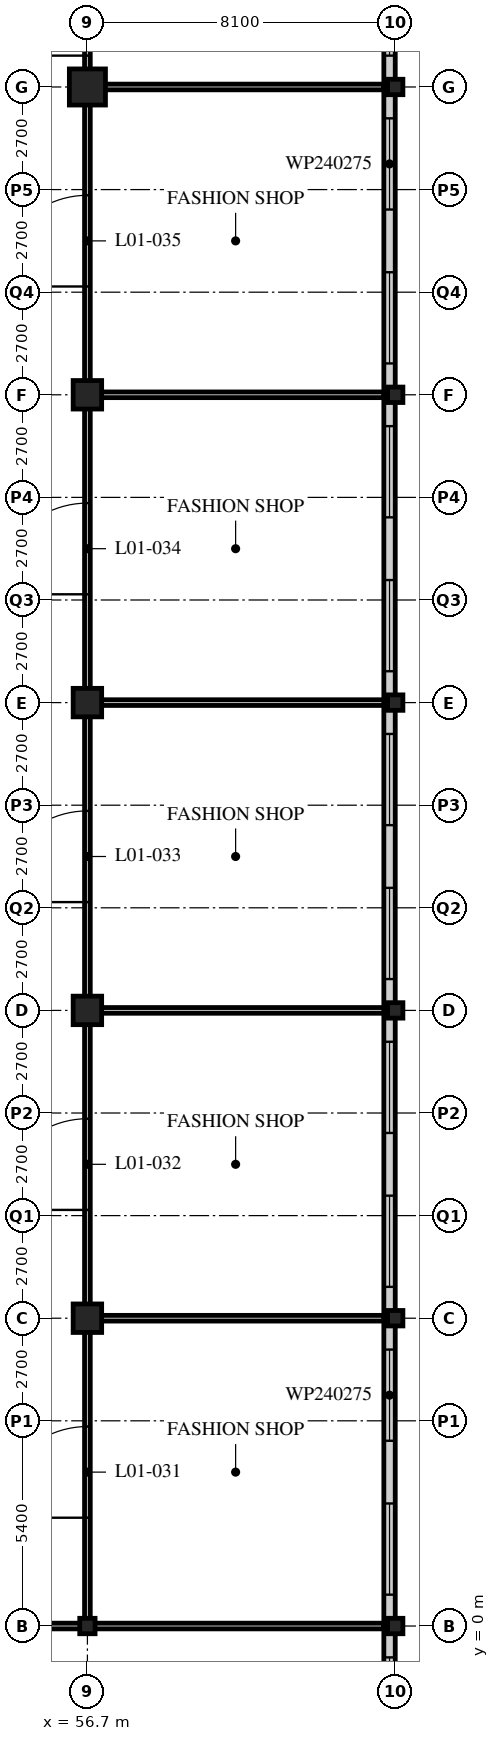
"""IFC4 building model, lengths in metres.
Left out: names, types, materials, properties, quantities, classifications, styles, units other than length and angle.
Written with IfcOpenShell. Run it as: python <this file> out.ifc"""

import sys

from ifc_helpers import new_model, si_unit, direction, frame, frame_2d, origin, origin_with_axes, origin_2d, place, context, subcontext, project, spatial, rectangle, hollow_rectangle, i_section, extrude, element, fill, save


model = new_model("IFC4")
c1 = context("Model", 3, precision=1e-05, world=origin(), true_north=direction((0.0, 1.0)))
c2 = subcontext(c1, "Body", "Model", "MODEL_VIEW")
j1 = project(units=[si_unit("LENGTHUNIT", "METRE"), si_unit("PLANEANGLEUNIT", "RADIAN")], contexts=[c1])
p1 = place(None, origin())
s1 = spatial("IfcSite", under=j1, at=p1, CompositionType="ELEMENT")
p2 = place(p1, origin())
s2 = spatial("IfcBuilding", under=s1, at=p2, CompositionType="ELEMENT")
p3 = place(p2, frame((0.0, 0.0, 6.0)))
s3 = spatial("IfcBuildingStorey", under=s2, at=p3, CompositionType="ELEMENT", Elevation=6.0)
p4 = place(p3, frame((56.7, 0.0, 0.0), z_axis=(0.0, 0.0, 1.0), x_axis=(1.0, 0.0, 0.0)))
e1 = element("IfcColumn", 1, at=p4, inside=s3, PredefinedType="COLUMN", context=c2, shape_type="SweptSolid", body=[
    extrude(i_section(OverallWidth=0.403, OverallDepth=0.406, WebThickness=0.027, FlangeThickness=0.043, FilletRadius=0.015, at=origin_2d()), origin(), (0.0, 0.0, 1.0), 5.4),
])
for number, where, z_axis, x_axis in (
    (2, (56.7, 8.1, 0.0), (0.0, 0.0, 1.0), (1.0, 0.0, 0.0)),
    (3, (56.7, 16.2, 0.0), (0.0, 0.0, 1.0), (1.0, 0.0, 0.0)),
    (4, (56.7, 24.3, 0.0), (0.0, 0.0, 1.0), (1.0, 0.0, 0.0)),
    (5, (56.7, 32.4, 0.0), (0.0, 0.0, 1.0), (1.0, 0.0, 0.0)),
):
    element("IfcColumn", number, at=place(p3, frame(where, z_axis=z_axis, x_axis=x_axis)), inside=s3, PredefinedType="COLUMN", context=c2, shape_type="SweptSolid", body=[
        extrude(hollow_rectangle(XDim=0.75, YDim=0.75, WallThickness=0.07, at=origin_2d()), origin(), (0.0, 0.0, 1.0), 5.4),
    ])
p5 = place(p3, frame((56.7, 40.5, 0.0), z_axis=(0.0, 0.0, 1.0), x_axis=(1.0, 0.0, 0.0)))
e6 = element("IfcColumn", 6, at=p5, inside=s3, PredefinedType="COLUMN", context=c2, shape_type="SweptSolid", body=[
    extrude(hollow_rectangle(XDim=0.95, YDim=0.95, WallThickness=0.1, at=origin_2d()), origin(), (0.0, 0.0, 1.0), 5.4),
])
for number, where, z_axis, x_axis in (
    (7, (64.8, 0.0, 0.0), (0.0, 0.0, 1.0), (1.0, 0.0, 0.0)),
    (8, (64.8, 8.1, 0.0), (0.0, 0.0, 1.0), (1.0, 0.0, 0.0)),
    (9, (64.8, 16.2, 0.0), (0.0, 0.0, 1.0), (1.0, 0.0, 0.0)),
    (10, (64.8, 24.3, 0.0), (0.0, 0.0, 1.0), (1.0, 0.0, 0.0)),
    (11, (64.8, 32.4, 0.0), (0.0, 0.0, 1.0), (1.0, 0.0, 0.0)),
    (12, (64.8, 40.5, 0.0), (0.0, 0.0, 1.0), (1.0, 0.0, 0.0)),
):
    element("IfcColumn", number, at=place(p3, frame(where, z_axis=z_axis, x_axis=x_axis)), inside=s3, PredefinedType="COLUMN", context=c2, shape_type="SweptSolid", body=[
        extrude(i_section(OverallWidth=0.403, OverallDepth=0.406, WebThickness=0.027, FlangeThickness=0.043, FilletRadius=0.015, at=origin_2d()), origin(), (0.0, 0.0, 1.0), 5.4),
    ])
p6 = place(p3, frame((64.65, -7.85, 0.0), z_axis=(0.0, 0.0, 1.0), x_axis=(0.0, 1.0, 0.0)))
e13 = element("IfcWall", 13, at=p6, inside=s3, PredefinedType="SOLIDWALL", context=c2, shape_type="SweptSolid", body=[
    extrude(rectangle(XDim=56.45, YDim=0.3, at=frame_2d((28.225, 0.0))), origin(), (0.0, 0.0, 1.0), 5.15),
])
p7 = place(p6, frame((0.575, 0.0, 1.0)))
e14 = element("IfcOpeningElement", 14, at=p7, cuts=e13, PredefinedType="OPENING", context=c2, shape_type="SweptSolid", body=[
    extrude(rectangle(XDim=2.4, YDim=2.75, at=frame_2d((1.2, 1.375))), frame((0.0, 0.16, 0.0), z_axis=(0.0, -1.0, 0.0), x_axis=(1.0, 0.0, 0.0)), (0.0, 0.0, 1.0), 0.32),
])
p8 = place(p6, frame((4.625, 0.0, 1.0)))
e15 = element("IfcOpeningElement", 15, at=p8, cuts=e13, PredefinedType="OPENING", context=c2, shape_type="SweptSolid", body=[
    extrude(rectangle(XDim=2.4, YDim=2.75, at=frame_2d((1.2, 1.375))), frame((0.0, 0.16, 0.0), z_axis=(0.0, -1.0, 0.0), x_axis=(1.0, 0.0, 0.0)), (0.0, 0.0, 1.0), 0.32),
])
p9 = place(p6, frame((8.675, 0.0, 1.0)))
e16 = element("IfcOpeningElement", 16, at=p9, cuts=e13, PredefinedType="OPENING", context=c2, shape_type="SweptSolid", body=[
    extrude(rectangle(XDim=2.4, YDim=2.75, at=frame_2d((1.2, 1.375))), frame((0.0, 0.16, 0.0), z_axis=(0.0, -1.0, 0.0), x_axis=(1.0, 0.0, 0.0)), (0.0, 0.0, 1.0), 0.32),
])
p10 = place(p6, frame((12.725, 0.0, 1.0)))
e17 = element("IfcOpeningElement", 17, at=p10, cuts=e13, PredefinedType="OPENING", context=c2, shape_type="SweptSolid", body=[
    extrude(rectangle(XDim=2.4, YDim=2.75, at=frame_2d((1.2, 1.375))), frame((0.0, 0.16, 0.0), z_axis=(0.0, -1.0, 0.0), x_axis=(1.0, 0.0, 0.0)), (0.0, 0.0, 1.0), 0.32),
])
p11 = place(p6, frame((16.775, 0.0, 1.0)))
e18 = element("IfcOpeningElement", 18, at=p11, cuts=e13, PredefinedType="OPENING", context=c2, shape_type="SweptSolid", body=[
    extrude(rectangle(XDim=2.4, YDim=2.75, at=frame_2d((1.2, 1.375))), frame((0.0, 0.16, 0.0), z_axis=(0.0, -1.0, 0.0), x_axis=(1.0, 0.0, 0.0)), (0.0, 0.0, 1.0), 0.32),
])
p12 = place(p6, frame((20.825, 0.0, 1.0)))
e19 = element("IfcOpeningElement", 19, at=p12, cuts=e13, PredefinedType="OPENING", context=c2, shape_type="SweptSolid", body=[
    extrude(rectangle(XDim=2.4, YDim=2.75, at=frame_2d((1.2, 1.375))), frame((0.0, 0.16, 0.0), z_axis=(0.0, -1.0, 0.0), x_axis=(1.0, 0.0, 0.0)), (0.0, 0.0, 1.0), 0.32),
])
p13 = place(p6, frame((24.875, 0.0, 1.0)))
e20 = element("IfcOpeningElement", 20, at=p13, cuts=e13, PredefinedType="OPENING", context=c2, shape_type="SweptSolid", body=[
    extrude(rectangle(XDim=2.4, YDim=2.75, at=frame_2d((1.2, 1.375))), frame((0.0, 0.16, 0.0), z_axis=(0.0, -1.0, 0.0), x_axis=(1.0, 0.0, 0.0)), (0.0, 0.0, 1.0), 0.32),
])
p14 = place(p6, frame((28.925, 0.0, 1.0)))
e21 = element("IfcOpeningElement", 21, at=p14, cuts=e13, PredefinedType="OPENING", context=c2, shape_type="SweptSolid", body=[
    extrude(rectangle(XDim=2.4, YDim=2.75, at=frame_2d((1.2, 1.375))), frame((0.0, 0.16, 0.0), z_axis=(0.0, -1.0, 0.0), x_axis=(1.0, 0.0, 0.0)), (0.0, 0.0, 1.0), 0.32),
])
p15 = place(p6, frame((32.975, 0.0, 1.0)))
e22 = element("IfcOpeningElement", 22, at=p15, cuts=e13, PredefinedType="OPENING", context=c2, shape_type="SweptSolid", body=[
    extrude(rectangle(XDim=2.4, YDim=2.75, at=frame_2d((1.2, 1.375))), frame((0.0, 0.16, 0.0), z_axis=(0.0, -1.0, 0.0), x_axis=(1.0, 0.0, 0.0)), (0.0, 0.0, 1.0), 0.32),
])
p16 = place(p6, frame((37.025, 0.0, 1.0)))
e23 = element("IfcOpeningElement", 23, at=p16, cuts=e13, PredefinedType="OPENING", context=c2, shape_type="SweptSolid", body=[
    extrude(rectangle(XDim=2.4, YDim=2.75, at=frame_2d((1.2, 1.375))), frame((0.0, 0.16, 0.0), z_axis=(0.0, -1.0, 0.0), x_axis=(1.0, 0.0, 0.0)), (0.0, 0.0, 1.0), 0.32),
])
p17 = place(p6, frame((41.075, 0.0, 1.0)))
e24 = element("IfcOpeningElement", 24, at=p17, cuts=e13, PredefinedType="OPENING", context=c2, shape_type="SweptSolid", body=[
    extrude(rectangle(XDim=2.4, YDim=2.75, at=frame_2d((1.2, 1.375))), frame((0.0, 0.16, 0.0), z_axis=(0.0, -1.0, 0.0), x_axis=(1.0, 0.0, 0.0)), (0.0, 0.0, 1.0), 0.32),
])
p18 = place(p6, frame((45.125, 0.0, 1.0)))
e25 = element("IfcOpeningElement", 25, at=p18, cuts=e13, PredefinedType="OPENING", context=c2, shape_type="SweptSolid", body=[
    extrude(rectangle(XDim=2.4, YDim=2.75, at=frame_2d((1.2, 1.375))), frame((0.0, 0.16, 0.0), z_axis=(0.0, -1.0, 0.0), x_axis=(1.0, 0.0, 0.0)), (0.0, 0.0, 1.0), 0.32),
])
p19 = place(p6, frame((49.175, 0.0, 1.0)))
e26 = element("IfcOpeningElement", 26, at=p19, cuts=e13, PredefinedType="OPENING", context=c2, shape_type="SweptSolid", body=[
    extrude(rectangle(XDim=2.4, YDim=2.75, at=frame_2d((1.2, 1.375))), frame((0.0, 0.16, 0.0), z_axis=(0.0, -1.0, 0.0), x_axis=(1.0, 0.0, 0.0)), (0.0, 0.0, 1.0), 0.32),
])
p20 = place(p6, frame((53.225, 0.0, 1.0)))
e27 = element("IfcOpeningElement", 27, at=p20, cuts=e13, PredefinedType="OPENING", context=c2, shape_type="SweptSolid", body=[
    extrude(rectangle(XDim=2.4, YDim=2.75, at=frame_2d((1.2, 1.375))), frame((0.0, 0.16, 0.0), z_axis=(0.0, -1.0, 0.0), x_axis=(1.0, 0.0, 0.0)), (0.0, 0.0, 1.0), 0.32),
])
p21 = place(p3, origin_with_axes())
e28 = element("IfcWall", 28, at=p21, inside=s3, PredefinedType="PARTITIONING", context=c2, shape_type="SweptSolid", body=[
    extrude(rectangle(XDim=56.7, YDim=0.15, at=frame_2d((28.35, 0.0))), origin(), (0.0, 0.0, 1.0), 4.538),
])
p22 = place(p21, frame((10.95, 0.0, 0.0)))
e29 = element("IfcOpeningElement", 29, at=p22, cuts=e28, PredefinedType="OPENING", context=c2, shape_type="SweptSolid", body=[
    extrude(rectangle(XDim=2.4, YDim=2.7, at=frame_2d((1.2, 1.35))), frame((0.0, 0.085, 0.0), z_axis=(0.0, -1.0, 0.0), x_axis=(1.0, 0.0, 0.0)), (0.0, 0.0, 1.0), 0.17),
])
p23 = place(p21, frame((19.05, 0.0, 0.0)))
e30 = element("IfcOpeningElement", 30, at=p23, cuts=e28, PredefinedType="OPENING", context=c2, shape_type="SweptSolid", body=[
    extrude(rectangle(XDim=2.4, YDim=2.7, at=frame_2d((1.2, 1.35))), frame((0.0, 0.085, 0.0), z_axis=(0.0, -1.0, 0.0), x_axis=(1.0, 0.0, 0.0)), (0.0, 0.0, 1.0), 0.17),
])
p24 = place(p21, frame((27.15, 0.0, 0.0)))
e31 = element("IfcOpeningElement", 31, at=p24, cuts=e28, PredefinedType="OPENING", context=c2, shape_type="SweptSolid", body=[
    extrude(rectangle(XDim=2.4, YDim=2.7, at=frame_2d((1.2, 1.35))), frame((0.0, 0.085, 0.0), z_axis=(0.0, -1.0, 0.0), x_axis=(1.0, 0.0, 0.0)), (0.0, 0.0, 1.0), 0.17),
])
p25 = place(p21, frame((35.25, 0.0, 0.0)))
e32 = element("IfcOpeningElement", 32, at=p25, cuts=e28, PredefinedType="OPENING", context=c2, shape_type="SweptSolid", body=[
    extrude(rectangle(XDim=2.4, YDim=2.7, at=frame_2d((1.2, 1.35))), frame((0.0, 0.085, 0.0), z_axis=(0.0, -1.0, 0.0), x_axis=(1.0, 0.0, 0.0)), (0.0, 0.0, 1.0), 0.17),
])
p26 = place(p21, frame((43.35, 0.0, 0.0)))
e33 = element("IfcOpeningElement", 33, at=p26, cuts=e28, PredefinedType="OPENING", context=c2, shape_type="SweptSolid", body=[
    extrude(rectangle(XDim=2.4, YDim=2.7, at=frame_2d((1.2, 1.35))), frame((0.0, 0.085, 0.0), z_axis=(0.0, -1.0, 0.0), x_axis=(1.0, 0.0, 0.0)), (0.0, 0.0, 1.0), 0.17),
])
p27 = place(p21, frame((2.85, 0.0, 0.0)))
e34 = element("IfcOpeningElement", 34, at=p27, cuts=e28, PredefinedType="OPENING", context=c2, shape_type="SweptSolid", body=[
    extrude(rectangle(XDim=2.4, YDim=2.7, at=frame_2d((1.2, 1.35))), frame((0.0, 0.085, 0.0), z_axis=(0.0, -1.0, 0.0), x_axis=(1.0, 0.0, 0.0)), (0.0, 0.0, 1.0), 0.17),
])
p28 = place(p21, frame((51.45, 0.0, 0.0)))
e35 = element("IfcOpeningElement", 35, at=p28, cuts=e28, PredefinedType="OPENING", context=c2, shape_type="SweptSolid", body=[
    extrude(rectangle(XDim=2.4, YDim=2.7, at=frame_2d((1.2, 1.35))), frame((0.0, 0.085, 0.0), z_axis=(0.0, -1.0, 0.0), x_axis=(1.0, 0.0, 0.0)), (0.0, 0.0, 1.0), 0.17),
])
p29 = place(p3, frame((56.7, 0.0, 0.0), z_axis=(0.0, 0.0, 1.0), x_axis=(0.0, 1.0, 0.0)))
e36 = element("IfcWall", 36, at=p29, inside=s3, PredefinedType="PARTITIONING", context=c2, shape_type="SweptSolid", body=[
    extrude(rectangle(XDim=44.1, YDim=0.15, at=frame_2d((22.05, 0.0))), origin(), (0.0, 0.0, 1.0), 4.538),
])
p30 = place(p29, frame((2.85, 0.0, 0.0)))
e37 = element("IfcOpeningElement", 37, at=p30, cuts=e36, PredefinedType="OPENING", context=c2, shape_type="SweptSolid", body=[
    extrude(rectangle(XDim=2.4, YDim=2.7, at=frame_2d((1.2, 1.35))), frame((0.0, 0.085, 0.0), z_axis=(0.0, -1.0, 0.0), x_axis=(1.0, 0.0, 0.0)), (0.0, 0.0, 1.0), 0.17),
])
p31 = place(p29, frame((10.95, 0.0, 0.0)))
e38 = element("IfcOpeningElement", 38, at=p31, cuts=e36, PredefinedType="OPENING", context=c2, shape_type="SweptSolid", body=[
    extrude(rectangle(XDim=2.4, YDim=2.7, at=frame_2d((1.2, 1.35))), frame((0.0, 0.085, 0.0), z_axis=(0.0, -1.0, 0.0), x_axis=(1.0, 0.0, 0.0)), (0.0, 0.0, 1.0), 0.17),
])
p32 = place(p29, frame((19.05, 0.0, 0.0)))
e39 = element("IfcOpeningElement", 39, at=p32, cuts=e36, PredefinedType="OPENING", context=c2, shape_type="SweptSolid", body=[
    extrude(rectangle(XDim=2.4, YDim=2.7, at=frame_2d((1.2, 1.35))), frame((0.0, 0.085, 0.0), z_axis=(0.0, -1.0, 0.0), x_axis=(1.0, 0.0, 0.0)), (0.0, 0.0, 1.0), 0.17),
])
p33 = place(p29, frame((27.15, 0.0, 0.0)))
e40 = element("IfcOpeningElement", 40, at=p33, cuts=e36, PredefinedType="OPENING", context=c2, shape_type="SweptSolid", body=[
    extrude(rectangle(XDim=2.4, YDim=2.7, at=frame_2d((1.2, 1.35))), frame((0.0, 0.085, 0.0), z_axis=(0.0, -1.0, 0.0), x_axis=(1.0, 0.0, 0.0)), (0.0, 0.0, 1.0), 0.17),
])
p34 = place(p29, frame((35.25, 0.0, 0.0)))
e41 = element("IfcOpeningElement", 41, at=p34, cuts=e36, PredefinedType="OPENING", context=c2, shape_type="SweptSolid", body=[
    extrude(rectangle(XDim=2.4, YDim=2.7, at=frame_2d((1.2, 1.35))), frame((0.0, 0.085, 0.0), z_axis=(0.0, -1.0, 0.0), x_axis=(1.0, 0.0, 0.0)), (0.0, 0.0, 1.0), 0.17),
])
p35 = place(p29, frame((41.325, 0.0, 0.0)))
e42 = element("IfcOpeningElement", 42, at=p35, cuts=e36, PredefinedType="OPENING", context=c2, shape_type="SweptSolid", body=[
    extrude(rectangle(XDim=2.4, YDim=2.7, at=frame_2d((1.2, 1.35))), frame((0.0, 0.085, 0.0), z_axis=(0.0, -1.0, 0.0), x_axis=(1.0, 0.0, 0.0)), (0.0, 0.0, 1.0), 0.17),
])
for number, where, z_axis, x_axis in (
    (43, (56.7, 8.1, 0.0), (0.0, 0.0, 1.0), (1.0, 0.0, 0.0)),
    (44, (56.7, 16.2, 0.0), (0.0, 0.0, 1.0), (1.0, 0.0, 0.0)),
    (45, (56.7, 24.3, 0.0), (0.0, 0.0, 1.0), (1.0, 0.0, 0.0)),
    (46, (56.7, 32.4, 0.0), (0.0, 0.0, 1.0), (1.0, 0.0, 0.0)),
    (47, (56.7, 40.5, 0.0), (0.0, 0.0, 1.0), (1.0, 0.0, 0.0)),
    (48, (56.7, 0.0, 0.0), (0.0, 0.0, 1.0), (1.0, 0.0, 0.0)),
):
    element("IfcWall", number, at=place(p3, frame(where, z_axis=z_axis, x_axis=x_axis)), inside=s3, PredefinedType="PARTITIONING", context=c2, shape_type="SweptSolid", body=[
        extrude(rectangle(XDim=7.8, YDim=0.15, at=frame_2d((3.9, 0.0))), origin(), (0.0, 0.0, 1.0), 4.538),
    ])
p36 = place(p8, origin())
e49 = element("IfcWindow", 49, at=p36, inside=s3, PartitioningType="SINGLE_PANEL", PredefinedType="WINDOW", context=c2, shape_type="SweptSolid", body=[
    extrude(rectangle(XDim=2.4, YDim=2.75, at=frame_2d((1.2, 1.375))), frame((0.0, 0.03, 0.0), z_axis=(0.0, -1.0, 0.0), x_axis=(1.0, 0.0, 0.0)), (0.0, 0.0, 1.0), 0.06),
])
fill(e15, e49)
p37 = place(p9, origin())
e50 = element("IfcWindow", 50, at=p37, inside=s3, PartitioningType="SINGLE_PANEL", PredefinedType="WINDOW", context=c2, shape_type="SweptSolid", body=[
    extrude(rectangle(XDim=2.4, YDim=2.75, at=frame_2d((1.2, 1.375))), frame((0.0, 0.03, 0.0), z_axis=(0.0, -1.0, 0.0), x_axis=(1.0, 0.0, 0.0)), (0.0, 0.0, 1.0), 0.06),
])
fill(e16, e50)
p38 = place(p10, origin())
e51 = element("IfcWindow", 51, at=p38, inside=s3, PartitioningType="SINGLE_PANEL", PredefinedType="WINDOW", context=c2, shape_type="SweptSolid", body=[
    extrude(rectangle(XDim=2.4, YDim=2.75, at=frame_2d((1.2, 1.375))), frame((0.0, 0.03, 0.0), z_axis=(0.0, -1.0, 0.0), x_axis=(1.0, 0.0, 0.0)), (0.0, 0.0, 1.0), 0.06),
])
fill(e17, e51)
p39 = place(p11, origin())
e52 = element("IfcWindow", 52, at=p39, inside=s3, PartitioningType="SINGLE_PANEL", PredefinedType="WINDOW", context=c2, shape_type="SweptSolid", body=[
    extrude(rectangle(XDim=2.4, YDim=2.75, at=frame_2d((1.2, 1.375))), frame((0.0, 0.03, 0.0), z_axis=(0.0, -1.0, 0.0), x_axis=(1.0, 0.0, 0.0)), (0.0, 0.0, 1.0), 0.06),
])
fill(e18, e52)
p40 = place(p12, origin())
e53 = element("IfcWindow", 53, at=p40, inside=s3, PartitioningType="SINGLE_PANEL", PredefinedType="WINDOW", context=c2, shape_type="SweptSolid", body=[
    extrude(rectangle(XDim=2.4, YDim=2.75, at=frame_2d((1.2, 1.375))), frame((0.0, 0.03, 0.0), z_axis=(0.0, -1.0, 0.0), x_axis=(1.0, 0.0, 0.0)), (0.0, 0.0, 1.0), 0.06),
])
fill(e19, e53)
p41 = place(p13, origin())
e54 = element("IfcWindow", 54, at=p41, inside=s3, PartitioningType="SINGLE_PANEL", PredefinedType="WINDOW", context=c2, shape_type="SweptSolid", body=[
    extrude(rectangle(XDim=2.4, YDim=2.75, at=frame_2d((1.2, 1.375))), frame((0.0, 0.03, 0.0), z_axis=(0.0, -1.0, 0.0), x_axis=(1.0, 0.0, 0.0)), (0.0, 0.0, 1.0), 0.06),
])
fill(e20, e54)
p42 = place(p14, origin())
e55 = element("IfcWindow", 55, at=p42, inside=s3, PartitioningType="SINGLE_PANEL", PredefinedType="WINDOW", context=c2, shape_type="SweptSolid", body=[
    extrude(rectangle(XDim=2.4, YDim=2.75, at=frame_2d((1.2, 1.375))), frame((0.0, 0.03, 0.0), z_axis=(0.0, -1.0, 0.0), x_axis=(1.0, 0.0, 0.0)), (0.0, 0.0, 1.0), 0.06),
])
fill(e21, e55)
p43 = place(p15, origin())
e56 = element("IfcWindow", 56, at=p43, inside=s3, PartitioningType="SINGLE_PANEL", PredefinedType="WINDOW", context=c2, shape_type="SweptSolid", body=[
    extrude(rectangle(XDim=2.4, YDim=2.75, at=frame_2d((1.2, 1.375))), frame((0.0, 0.03, 0.0), z_axis=(0.0, -1.0, 0.0), x_axis=(1.0, 0.0, 0.0)), (0.0, 0.0, 1.0), 0.06),
])
fill(e22, e56)
p44 = place(p16, origin())
e57 = element("IfcWindow", 57, at=p44, inside=s3, PartitioningType="SINGLE_PANEL", PredefinedType="WINDOW", context=c2, shape_type="SweptSolid", body=[
    extrude(rectangle(XDim=2.4, YDim=2.75, at=frame_2d((1.2, 1.375))), frame((0.0, 0.03, 0.0), z_axis=(0.0, -1.0, 0.0), x_axis=(1.0, 0.0, 0.0)), (0.0, 0.0, 1.0), 0.06),
])
fill(e23, e57)
p45 = place(p17, origin())
e58 = element("IfcWindow", 58, at=p45, inside=s3, PartitioningType="SINGLE_PANEL", PredefinedType="WINDOW", context=c2, shape_type="SweptSolid", body=[
    extrude(rectangle(XDim=2.4, YDim=2.75, at=frame_2d((1.2, 1.375))), frame((0.0, 0.03, 0.0), z_axis=(0.0, -1.0, 0.0), x_axis=(1.0, 0.0, 0.0)), (0.0, 0.0, 1.0), 0.06),
])
fill(e24, e58)
p46 = place(p18, origin())
e59 = element("IfcWindow", 59, at=p46, inside=s3, PartitioningType="SINGLE_PANEL", PredefinedType="WINDOW", context=c2, shape_type="SweptSolid", body=[
    extrude(rectangle(XDim=2.4, YDim=2.75, at=frame_2d((1.2, 1.375))), frame((0.0, 0.03, 0.0), z_axis=(0.0, -1.0, 0.0), x_axis=(1.0, 0.0, 0.0)), (0.0, 0.0, 1.0), 0.06),
])
fill(e25, e59)
p47 = place(p19, origin())
e60 = element("IfcWindow", 60, at=p47, inside=s3, PartitioningType="SINGLE_PANEL", PredefinedType="WINDOW", context=c2, shape_type="SweptSolid", body=[
    extrude(rectangle(XDim=2.4, YDim=2.75, at=frame_2d((1.2, 1.375))), frame((0.0, 0.03, 0.0), z_axis=(0.0, -1.0, 0.0), x_axis=(1.0, 0.0, 0.0)), (0.0, 0.0, 1.0), 0.06),
])
fill(e26, e60)
p48 = place(p30, origin())
e61 = element("IfcDoor", 61, at=p48, inside=s3, OperationType="DOUBLE_DOOR_SINGLE_SWING", PredefinedType="DOOR", context=c2, shape_type="SweptSolid", body=[
    extrude(rectangle(XDim=2.4, YDim=2.7, at=frame_2d((1.2, 1.35))), frame((0.0, 0.025, 0.0), z_axis=(0.0, -1.0, 0.0), x_axis=(1.0, 0.0, 0.0)), (0.0, 0.0, 1.0), 0.05),
])
fill(e37, e61)
p49 = place(p31, origin())
e62 = element("IfcDoor", 62, at=p49, inside=s3, OperationType="DOUBLE_DOOR_SINGLE_SWING", PredefinedType="DOOR", context=c2, shape_type="SweptSolid", body=[
    extrude(rectangle(XDim=2.4, YDim=2.7, at=frame_2d((1.2, 1.35))), frame((0.0, 0.025, 0.0), z_axis=(0.0, -1.0, 0.0), x_axis=(1.0, 0.0, 0.0)), (0.0, 0.0, 1.0), 0.05),
])
fill(e38, e62)
p50 = place(p32, origin())
e63 = element("IfcDoor", 63, at=p50, inside=s3, OperationType="DOUBLE_DOOR_SINGLE_SWING", PredefinedType="DOOR", context=c2, shape_type="SweptSolid", body=[
    extrude(rectangle(XDim=2.4, YDim=2.7, at=frame_2d((1.2, 1.35))), frame((0.0, 0.025, 0.0), z_axis=(0.0, -1.0, 0.0), x_axis=(1.0, 0.0, 0.0)), (0.0, 0.0, 1.0), 0.05),
])
fill(e39, e63)
p51 = place(p33, origin())
e64 = element("IfcDoor", 64, at=p51, inside=s3, OperationType="DOUBLE_DOOR_SINGLE_SWING", PredefinedType="DOOR", context=c2, shape_type="SweptSolid", body=[
    extrude(rectangle(XDim=2.4, YDim=2.7, at=frame_2d((1.2, 1.35))), frame((0.0, 0.025, 0.0), z_axis=(0.0, -1.0, 0.0), x_axis=(1.0, 0.0, 0.0)), (0.0, 0.0, 1.0), 0.05),
])
fill(e40, e64)
p52 = place(p34, origin())
e65 = element("IfcDoor", 65, at=p52, inside=s3, OperationType="DOUBLE_DOOR_SINGLE_SWING", PredefinedType="DOOR", context=c2, shape_type="SweptSolid", body=[
    extrude(rectangle(XDim=2.4, YDim=2.7, at=frame_2d((1.2, 1.35))), frame((0.0, 0.025, 0.0), z_axis=(0.0, -1.0, 0.0), x_axis=(1.0, 0.0, 0.0)), (0.0, 0.0, 1.0), 0.05),
])
fill(e41, e65)
p53 = place(p35, origin())
e66 = element("IfcDoor", 66, at=p53, inside=s3, OperationType="DOUBLE_DOOR_SINGLE_SWING", PredefinedType="DOOR", context=c2, shape_type="SweptSolid", body=[
    extrude(rectangle(XDim=2.4, YDim=2.7, at=frame_2d((1.2, 1.35))), frame((0.0, 0.025, 0.0), z_axis=(0.0, -1.0, 0.0), x_axis=(1.0, 0.0, 0.0)), (0.0, 0.0, 1.0), 0.05),
])
fill(e42, e66)
save(model, sys.argv[1])
